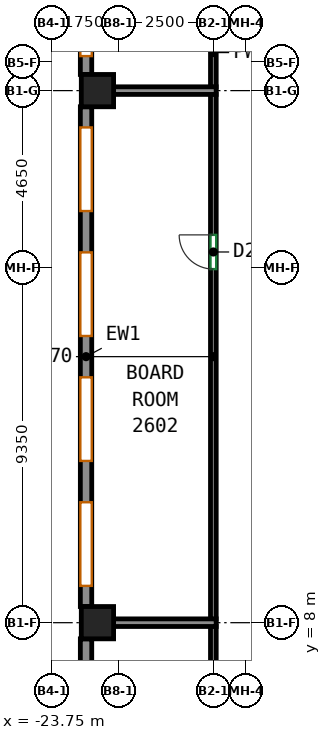
"""IFC4 building model, lengths in metres.
Left out: names, types, materials, properties, quantities, classifications, styles, units other than length and angle.
Written with IfcOpenShell. Run it as: python <this file> out.ifc"""

import sys

from ifc_helpers import new_model, si_unit, direction, frame, frame_2d, origin, origin_2d, place, context, subcontext, project, spatial, rectangle, extrude, source, transform, mapped, element, fill, save


model = new_model("IFC4")
c1 = context("Model", 3, precision=1e-05, world=origin(), true_north=direction((0.0, 1.0)))
c2 = subcontext(c1, "Body", "Model", "MODEL_VIEW")
j1 = project(units=[si_unit("LENGTHUNIT", "METRE"), si_unit("PLANEANGLEUNIT", "RADIAN")], contexts=[c1])
p1 = place(None, origin())
s1 = spatial("IfcSite", under=j1, at=p1, CompositionType="ELEMENT")
p2 = place(p1, origin())
s2 = spatial("IfcBuilding", under=s1, at=p2, CompositionType="ELEMENT")
p3 = place(p2, frame((0.0, 0.0, 112.6)))
s3 = spatial("IfcBuildingStorey", under=s2, at=p3, CompositionType="ELEMENT", Elevation=112.6)
m1 = source(origin(), c2, "Body", "SweptSolid", [
    extrude(rectangle(XDim=0.85, YDim=0.85, at=origin_2d()), origin(), (0.0, 0.0, 1.0), 3.72),
])
for number, where, z_axis, x_axis in (
    (1, (-22.55, 8.0, 0.0), (0.0, 0.0, 1.0), (1.0, 0.0, 0.0)),
    (2, (-22.55, 22.0, 0.0), (0.0, 0.0, 1.0), (1.0, 0.0, 0.0)),
):
    element("IfcColumn", number, at=place(p3, frame(where, z_axis=z_axis, x_axis=x_axis)), inside=s3, PredefinedType="COLUMN", context=c2, shape_type="MappedRepresentation", body=[
        mapped(m1, transform((0.0, 0.0, 0.0))),
    ])
m2 = source(origin(), c2, "Body", "SweptSolid", [
    extrude(rectangle(XDim=6.332, YDim=0.3, at=frame_2d((3.166, 0.0))), origin(), (0.0, 0.0, 1.0), 3.72),
])
p4 = place(p3, frame((-22.85, 28.757, 0.0), z_axis=(0.0, 0.0, 1.0), x_axis=(0.0, -1.0, 0.0)))
e3 = element("IfcWall", 3, at=p4, inside=s3, PredefinedType="SOLIDWALL", context=c2, shape_type="MappedRepresentation", body=[
    mapped(m2, transform((0.0, 0.0, 0.0))),
])
p5 = place(p4, frame((0.483, 0.0, 0.7)))
e4 = element("IfcOpeningElement", 4, at=p5, cuts=e3, PredefinedType="OPENING", context=c2, shape_type="SweptSolid", body=[
    extrude(rectangle(XDim=2.2, YDim=2.25, at=frame_2d((1.1, 1.125))), frame((0.0, 0.16, 0.0), z_axis=(0.0, -1.0, 0.0), x_axis=(1.0, 0.0, 0.0)), (0.0, 0.0, 1.0), 0.32),
])
p6 = place(p4, frame((3.649, 0.0, 0.7)))
e5 = element("IfcOpeningElement", 5, at=p6, cuts=e3, PredefinedType="OPENING", context=c2, shape_type="SweptSolid", body=[
    extrude(rectangle(XDim=2.2, YDim=2.25, at=frame_2d((1.1, 1.125))), frame((0.0, 0.16, 0.0), z_axis=(0.0, -1.0, 0.0), x_axis=(1.0, 0.0, 0.0)), (0.0, 0.0, 1.0), 0.32),
])
m3 = source(origin(), c2, "Body", "SweptSolid", [
    extrude(rectangle(XDim=13.15, YDim=0.3, at=frame_2d((6.575, 0.0))), origin(), (0.0, 0.0, 1.0), 3.72),
])
p7 = place(p3, frame((-22.85, 21.575, 0.0), z_axis=(0.0, 0.0, 1.0), x_axis=(0.0, -1.0, 0.0)))
e6 = element("IfcWall", 6, at=p7, inside=s3, PredefinedType="SOLIDWALL", context=c2, shape_type="MappedRepresentation", body=[
    mapped(m3, transform((0.0, 0.0, 0.0))),
])
p8 = place(p7, frame((0.544, 0.0, 0.7)))
e7 = element("IfcOpeningElement", 7, at=p8, cuts=e6, PredefinedType="OPENING", context=c2, shape_type="SweptSolid", body=[
    extrude(rectangle(XDim=2.2, YDim=2.25, at=frame_2d((1.1, 1.125))), frame((0.0, 0.16, 0.0), z_axis=(0.0, -1.0, 0.0), x_axis=(1.0, 0.0, 0.0)), (0.0, 0.0, 1.0), 0.32),
])
p9 = place(p7, frame((3.831, 0.0, 0.7)))
e8 = element("IfcOpeningElement", 8, at=p9, cuts=e6, PredefinedType="OPENING", context=c2, shape_type="SweptSolid", body=[
    extrude(rectangle(XDim=2.2, YDim=2.25, at=frame_2d((1.1, 1.125))), frame((0.0, 0.16, 0.0), z_axis=(0.0, -1.0, 0.0), x_axis=(1.0, 0.0, 0.0)), (0.0, 0.0, 1.0), 0.32),
])
p10 = place(p7, frame((7.119, 0.0, 0.7)))
e9 = element("IfcOpeningElement", 9, at=p10, cuts=e6, PredefinedType="OPENING", context=c2, shape_type="SweptSolid", body=[
    extrude(rectangle(XDim=2.2, YDim=2.25, at=frame_2d((1.1, 1.125))), frame((0.0, 0.16, 0.0), z_axis=(0.0, -1.0, 0.0), x_axis=(1.0, 0.0, 0.0)), (0.0, 0.0, 1.0), 0.32),
])
p11 = place(p7, frame((10.406, 0.0, 0.7)))
e10 = element("IfcOpeningElement", 10, at=p11, cuts=e6, PredefinedType="OPENING", context=c2, shape_type="SweptSolid", body=[
    extrude(rectangle(XDim=2.2, YDim=2.25, at=frame_2d((1.1, 1.125))), frame((0.0, 0.16, 0.0), z_axis=(0.0, -1.0, 0.0), x_axis=(1.0, 0.0, 0.0)), (0.0, 0.0, 1.0), 0.32),
])
m4 = source(origin(), c2, "Body", "SweptSolid", [
    extrude(rectangle(XDim=6.9, YDim=0.3, at=frame_2d((3.45, 0.0))), origin(), (0.0, 0.0, 1.0), 3.72),
])
p12 = place(p3, frame((-22.85, 7.575, 0.0), z_axis=(0.0, 0.0, 1.0), x_axis=(0.0, -1.0, 0.0)))
e11 = element("IfcWall", 11, at=p12, inside=s3, PredefinedType="SOLIDWALL", context=c2, shape_type="MappedRepresentation", body=[
    mapped(m4, transform((0.0, 0.0, 0.0))),
])
p13 = place(p12, frame((0.625, 0.0, 0.7)))
e12 = element("IfcOpeningElement", 12, at=p13, cuts=e11, PredefinedType="OPENING", context=c2, shape_type="SweptSolid", body=[
    extrude(rectangle(XDim=2.2, YDim=2.25, at=frame_2d((1.1, 1.125))), frame((0.0, 0.16, 0.0), z_axis=(0.0, -1.0, 0.0), x_axis=(1.0, 0.0, 0.0)), (0.0, 0.0, 1.0), 0.32),
])
p14 = place(p12, frame((4.075, 0.0, 0.7)))
e13 = element("IfcOpeningElement", 13, at=p14, cuts=e11, PredefinedType="OPENING", context=c2, shape_type="SweptSolid", body=[
    extrude(rectangle(XDim=2.2, YDim=2.25, at=frame_2d((1.1, 1.125))), frame((0.0, 0.16, 0.0), z_axis=(0.0, -1.0, 0.0), x_axis=(1.0, 0.0, 0.0)), (0.0, 0.0, 1.0), 0.32),
])
p15 = place(p3, frame((-19.5, 4.35, 0.0), z_axis=(0.0, 0.0, 1.0), x_axis=(0.0, 1.0, 0.0)))
e14 = element("IfcWall", 14, at=p15, inside=s3, PredefinedType="PARTITIONING", context=c2, shape_type="SweptSolid", body=[
    extrude(rectangle(XDim=3.56, YDim=0.15, at=frame_2d((1.78, 0.0))), origin(), (0.0, 0.0, 1.0), 3.07),
])
p16 = place(p3, frame((-19.5, 22.09, 0.0), z_axis=(0.0, 0.0, 1.0), x_axis=(0.0, 1.0, 0.0)))
e15 = element("IfcWall", 15, at=p16, inside=s3, PredefinedType="PARTITIONING", context=c2, shape_type="SweptSolid", body=[
    extrude(rectangle(XDim=3.035, YDim=0.15, at=frame_2d((1.518, 0.0))), origin(), (0.0, 0.0, 1.0), 3.07),
])
p17 = place(p16, frame((1.631, 0.0, 0.0)))
e16 = element("IfcOpeningElement", 16, at=p17, cuts=e15, PredefinedType="OPENING", context=c2, shape_type="SweptSolid", body=[
    extrude(rectangle(XDim=1.0, YDim=2.1, at=frame_2d((0.5, 1.05))), frame((0.0, 0.085, 0.0), z_axis=(0.0, -1.0, 0.0), x_axis=(1.0, 0.0, 0.0)), (0.0, 0.0, 1.0), 0.17),
])
p18 = place(p3, frame((-19.5, 8.09, 0.0), z_axis=(0.0, 0.0, 1.0), x_axis=(0.0, 1.0, 0.0)))
e17 = element("IfcWall", 17, at=p18, inside=s3, PredefinedType="PARTITIONING", context=c2, shape_type="SweptSolid", body=[
    extrude(rectangle(XDim=13.82, YDim=0.15, at=frame_2d((6.91, 0.0))), origin(), (0.0, 0.0, 1.0), 3.07),
])
p19 = place(p18, frame((9.214, 0.0, 0.0)))
e18 = element("IfcOpeningElement", 18, at=p19, cuts=e17, PredefinedType="OPENING", context=c2, shape_type="SweptSolid", body=[
    extrude(rectangle(XDim=0.9, YDim=2.1, at=frame_2d((0.45, 1.05))), frame((0.0, 0.085, 0.0), z_axis=(0.0, -1.0, 0.0), x_axis=(1.0, 0.0, 0.0)), (0.0, 0.0, 1.0), 0.17),
])
for number, where, z_axis, x_axis in (
    (19, (-22.125, 8.0, 0.0), (0.0, 0.0, 1.0), (1.0, 0.0, 0.0)),
    (20, (-22.125, 22.0, 0.0), (0.0, 0.0, 1.0), (1.0, 0.0, 0.0)),
):
    element("IfcWall", number, at=place(p3, frame(where, z_axis=z_axis, x_axis=x_axis)), inside=s3, PredefinedType="PARTITIONING", context=c2, shape_type="SweptSolid", body=[
        extrude(rectangle(XDim=2.699, YDim=0.2, at=frame_2d((1.35, 0.0))), origin(), (0.0, 0.0, 1.0), 3.72),
    ])
p20 = place(p6, origin())
e21 = element("IfcWindow", 21, at=p20, inside=s3, PartitioningType="SINGLE_PANEL", PredefinedType="WINDOW", context=c2, shape_type="SweptSolid", body=[
    extrude(rectangle(XDim=2.2, YDim=2.25, at=frame_2d((1.1, 1.125))), frame((0.0, 0.03, 0.0), z_axis=(0.0, -1.0, 0.0), x_axis=(1.0, 0.0, 0.0)), (0.0, 0.0, 1.0), 0.06),
])
fill(e5, e21)
p21 = place(p8, origin())
e22 = element("IfcWindow", 22, at=p21, inside=s3, PartitioningType="SINGLE_PANEL", PredefinedType="WINDOW", context=c2, shape_type="SweptSolid", body=[
    extrude(rectangle(XDim=2.2, YDim=2.25, at=frame_2d((1.1, 1.125))), frame((0.0, 0.03, 0.0), z_axis=(0.0, -1.0, 0.0), x_axis=(1.0, 0.0, 0.0)), (0.0, 0.0, 1.0), 0.06),
])
fill(e7, e22)
p22 = place(p9, origin())
e23 = element("IfcWindow", 23, at=p22, inside=s3, PartitioningType="SINGLE_PANEL", PredefinedType="WINDOW", context=c2, shape_type="SweptSolid", body=[
    extrude(rectangle(XDim=2.2, YDim=2.25, at=frame_2d((1.1, 1.125))), frame((0.0, 0.03, 0.0), z_axis=(0.0, -1.0, 0.0), x_axis=(1.0, 0.0, 0.0)), (0.0, 0.0, 1.0), 0.06),
])
fill(e8, e23)
p23 = place(p10, origin())
e24 = element("IfcWindow", 24, at=p23, inside=s3, PartitioningType="SINGLE_PANEL", PredefinedType="WINDOW", context=c2, shape_type="SweptSolid", body=[
    extrude(rectangle(XDim=2.2, YDim=2.25, at=frame_2d((1.1, 1.125))), frame((0.0, 0.03, 0.0), z_axis=(0.0, -1.0, 0.0), x_axis=(1.0, 0.0, 0.0)), (0.0, 0.0, 1.0), 0.06),
])
fill(e9, e24)
p24 = place(p11, origin())
e25 = element("IfcWindow", 25, at=p24, inside=s3, PartitioningType="SINGLE_PANEL", PredefinedType="WINDOW", context=c2, shape_type="SweptSolid", body=[
    extrude(rectangle(XDim=2.2, YDim=2.25, at=frame_2d((1.1, 1.125))), frame((0.0, 0.03, 0.0), z_axis=(0.0, -1.0, 0.0), x_axis=(1.0, 0.0, 0.0)), (0.0, 0.0, 1.0), 0.06),
])
fill(e10, e25)
p25 = place(p19, origin())
e26 = element("IfcDoor", 26, at=p25, inside=s3, OperationType="SINGLE_SWING_RIGHT", PredefinedType="DOOR", context=c2, shape_type="SweptSolid", body=[
    extrude(rectangle(XDim=0.9, YDim=2.1, at=frame_2d((0.45, 1.05))), frame((0.0, 0.025, 0.0), z_axis=(0.0, -1.0, 0.0), x_axis=(1.0, 0.0, 0.0)), (0.0, 0.0, 1.0), 0.05),
])
fill(e18, e26)
save(model, sys.argv[1])
